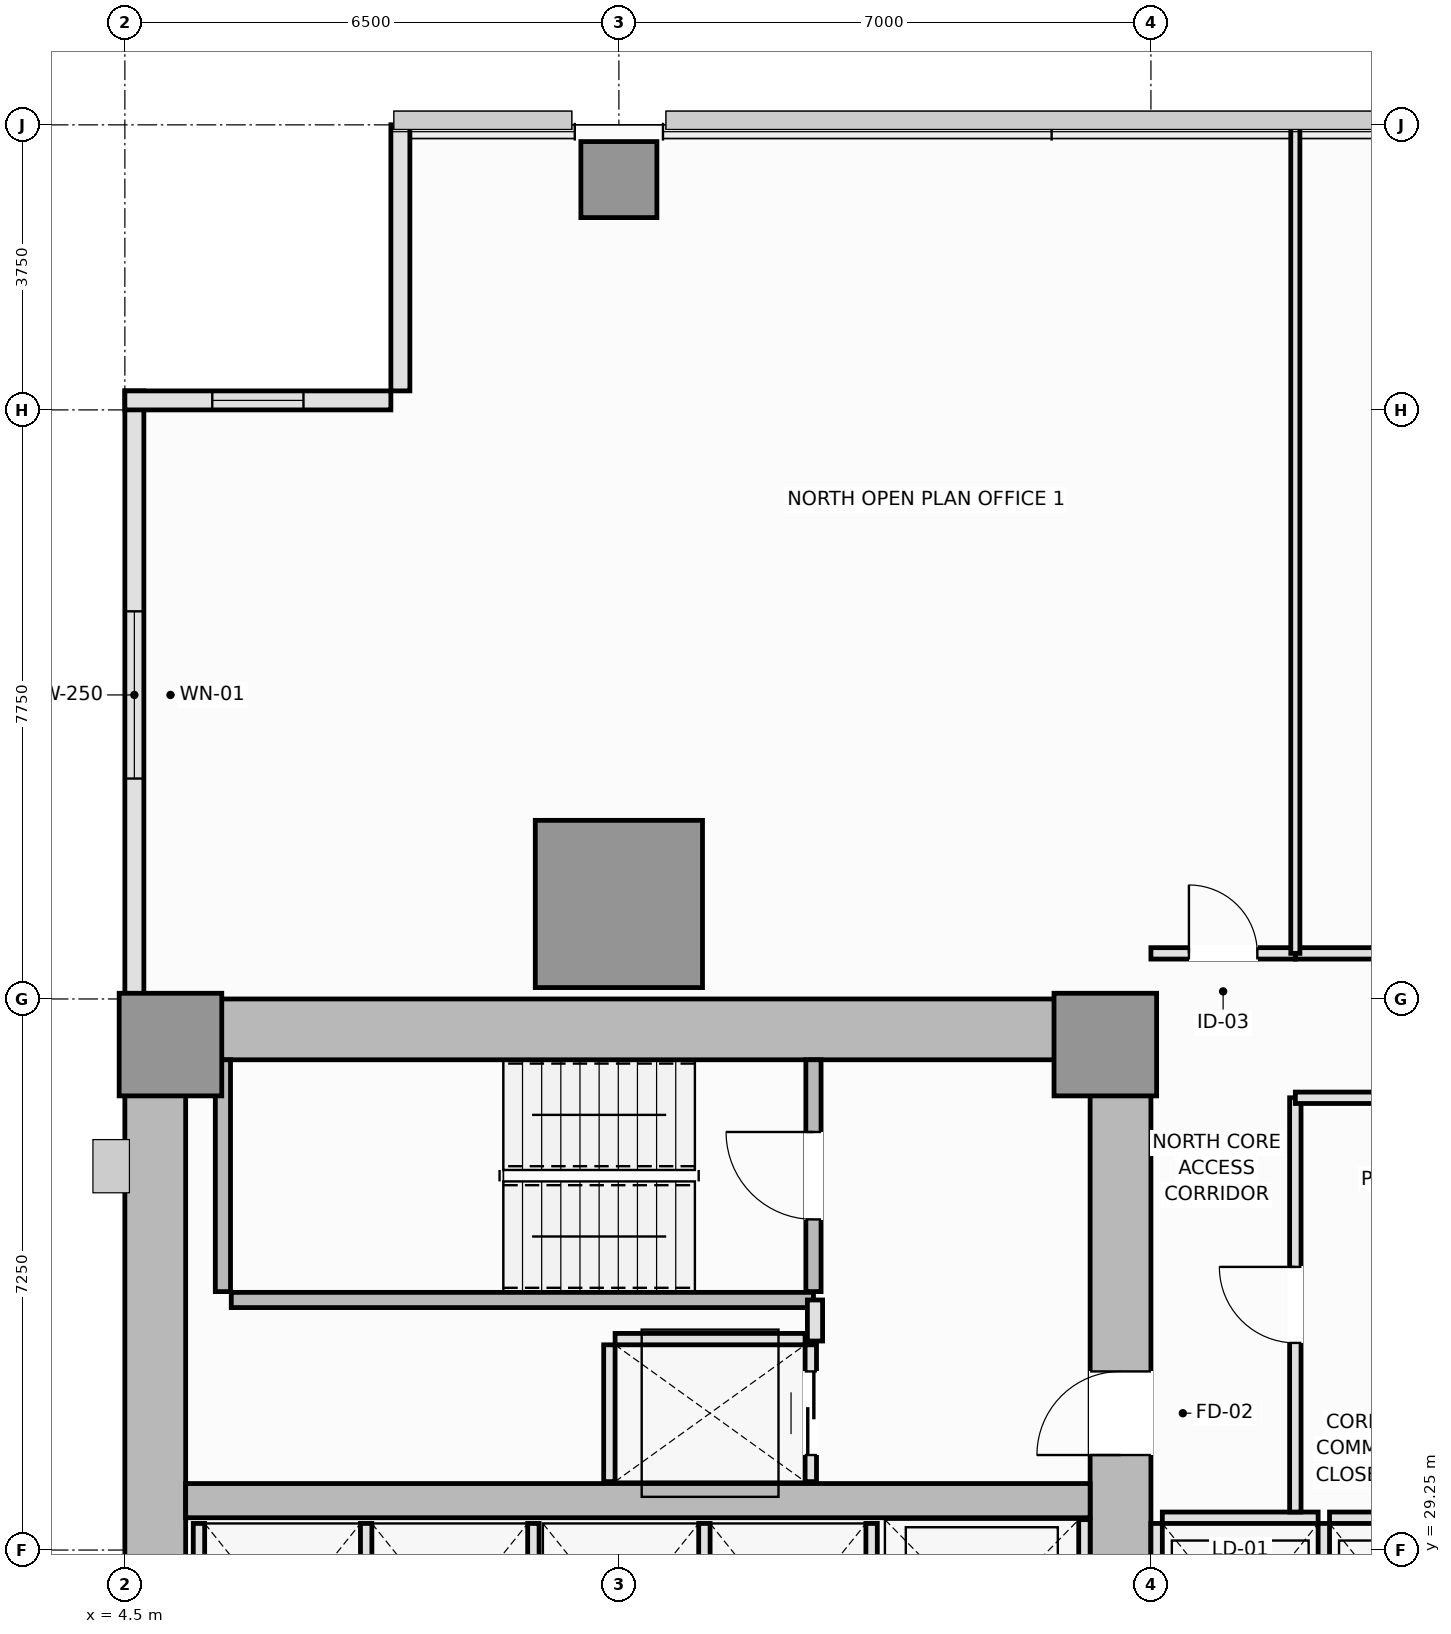
"""IFC4 building model, lengths in metres.
Left out: names, types, materials, properties, quantities, classifications, styles, units other than length and angle.
Written with IfcOpenShell. Run it as: python <this file> out.ifc"""

import sys

from ifc_helpers import new_model, si_unit, direction, frame, frame_2d, origin, origin_2d, place, context, subcontext, project, spatial, rectangle, extrude, element, fill, save


model = new_model("IFC4")
c1 = context("Model", 3, precision=1e-05, world=origin(), true_north=direction((0.0, 1.0)))
c2 = subcontext(c1, "Body", "Model", "MODEL_VIEW")
j1 = project(units=[si_unit("LENGTHUNIT", "METRE"), si_unit("PLANEANGLEUNIT", "RADIAN")], contexts=[c1])
p1 = place(None, origin())
s1 = spatial("IfcSite", under=j1, at=p1, CompositionType="ELEMENT")
p2 = place(p1, origin())
s2 = spatial("IfcBuilding", under=s1, at=p2, CompositionType="ELEMENT")
p3 = place(p2, frame((0.0, 0.0, 54.0)))
s3 = spatial("IfcBuildingStorey", under=s2, at=p3, CompositionType="ELEMENT", Elevation=54.0)
p4 = place(p3, frame((4.5, 36.1, 0.0), z_axis=(0.0, 0.0, 1.0), x_axis=(1.0, 0.0, 0.0)))
e1 = element("IfcWall", 1, at=p4, inside=s3, PredefinedType="SHEAR", context=c2, shape_type="SweptSolid", body=[
    extrude(rectangle(XDim=13.5, YDim=0.8, at=frame_2d((6.75, 0.0))), origin(), (0.0, 0.0, 1.0), 3.55),
])
p5 = place(p3, frame((4.9, 14.8, 0.0), z_axis=(0.0, 0.0, 1.0), x_axis=(0.0, 1.0, 0.0)))
e2 = element("IfcWall", 2, at=p5, inside=s3, PredefinedType="SHEAR", context=c2, shape_type="SweptSolid", body=[
    extrude(rectangle(XDim=20.9, YDim=0.8, at=frame_2d((10.45, 0.0))), origin(), (0.0, 0.0, 1.0), 3.55),
])
p6 = place(p3, frame((17.6, 27.05, 0.0), z_axis=(0.0, 0.0, 1.0), x_axis=(0.0, 1.0, 0.0)))
e3 = element("IfcWall", 3, at=p6, inside=s3, PredefinedType="SHEAR", context=c2, shape_type="SweptSolid", body=[
    extrude(rectangle(XDim=8.65, YDim=0.8, at=frame_2d((4.325, 0.0))), origin(), (0.0, 0.0, 1.0), 3.55),
])
p7 = place(p6, frame((3.45, 0.0, 0.0)))
e4 = element("IfcOpeningElement", 4, at=p7, cuts=e3, PredefinedType="OPENING", context=c2, shape_type="SweptSolid", body=[
    extrude(rectangle(XDim=1.1, YDim=2.15, at=frame_2d((0.55, 1.075))), frame((0.0, 0.41, 0.0), z_axis=(0.0, -1.0, 0.0), x_axis=(1.0, 0.0, 0.0)), (0.0, 0.0, 1.0), 0.82),
])
p8 = place(p3, frame((5.3, 29.9, 0.0), z_axis=(0.0, 0.0, 1.0), x_axis=(1.0, 0.0, 0.0)))
e5 = element("IfcWall", 5, at=p8, inside=s3, PredefinedType="SHEAR", context=c2, shape_type="SweptSolid", body=[
    extrude(rectangle(XDim=11.9, YDim=0.45, at=frame_2d((5.95, 0.0))), origin(), (0.0, 0.0, 1.0), 3.55),
])
for number, where, z_axis, x_axis in (
    (6, (5.1, 35.9, 0.0), (0.0, 0.0, 1.0), (1.0, 0.0, 0.0)),
    (7, (17.4, 35.9, 0.0), (0.0, 0.0, 1.0), (1.0, 0.0, 0.0)),
):
    element("IfcColumn", number, at=place(p3, frame(where, z_axis=z_axis, x_axis=x_axis)), inside=s3, PredefinedType="PILASTER", context=c2, shape_type="SweptSolid", body=[
        extrude(rectangle(XDim=1.35, YDim=1.35, at=origin_2d()), origin(), (0.0, 0.0, 1.0), 3.55),
    ])
p9 = place(p3, frame((11.0, 37.75, 0.0), z_axis=(0.0, 0.0, 1.0), x_axis=(1.0, 0.0, 0.0)))
e8 = element("IfcColumn", 8, at=p9, inside=s3, PredefinedType="COLUMN", context=c2, shape_type="SweptSolid", body=[
    extrude(rectangle(XDim=2.2, YDim=2.2, at=origin_2d()), origin(), (0.0, 0.0, 1.0), 3.55),
])
p10 = place(p3, frame((11.0, 47.28, 0.0), z_axis=(0.0, 0.0, 1.0), x_axis=(1.0, 0.0, 0.0)))
e9 = element("IfcColumn", 9, at=p10, inside=s3, PredefinedType="COLUMN", context=c2, shape_type="SweptSolid", body=[
    extrude(rectangle(XDim=1.0, YDim=1.0, at=origin_2d()), origin(), (0.0, 0.0, 1.0), 3.55),
])
p11 = place(p3, frame((4.625, 44.5, 0.0), z_axis=(0.0, 0.0, 1.0), x_axis=(0.0, -1.0, 0.0)))
e10 = element("IfcWall", 10, at=p11, inside=s3, PredefinedType="SOLIDWALL", context=c2, shape_type="SweptSolid", body=[
    extrude(rectangle(XDim=8.0, YDim=0.25, at=frame_2d((4.0, 0.0))), origin(), (0.0, 0.0, 1.0), 3.37),
])
p12 = place(p11, frame((2.9, 0.0, 0.9)))
e11 = element("IfcOpeningElement", 11, at=p12, cuts=e10, PredefinedType="OPENING", context=c2, shape_type="SweptSolid", body=[
    extrude(rectangle(XDim=2.2, YDim=1.8, at=frame_2d((1.1, 0.9))), frame((0.0, 0.135, 0.0), z_axis=(0.0, -1.0, 0.0), x_axis=(1.0, 0.0, 0.0)), (0.0, 0.0, 1.0), 0.27),
])
p13 = place(p3, frame((8.125, 48.0, 0.0), z_axis=(0.0, 0.0, 1.0), x_axis=(0.0, -1.0, 0.0)))
e12 = element("IfcWall", 12, at=p13, inside=s3, PredefinedType="SOLIDWALL", context=c2, shape_type="SweptSolid", body=[
    extrude(rectangle(XDim=3.5, YDim=0.25, at=frame_2d((1.75, 0.0))), origin(), (0.0, 0.0, 1.0), 3.37),
])
p14 = place(p3, frame((8.0, 44.375, 0.0), z_axis=(0.0, 0.0, 1.0), x_axis=(-1.0, 0.0, 0.0)))
e13 = element("IfcWall", 13, at=p14, inside=s3, PredefinedType="SOLIDWALL", context=c2, shape_type="SweptSolid", body=[
    extrude(rectangle(XDim=3.5, YDim=0.25, at=frame_2d((1.75, 0.0))), origin(), (0.0, 0.0, 1.0), 3.37),
])
p15 = place(p14, frame((1.15, 0.0, 0.9)))
e14 = element("IfcOpeningElement", 14, at=p15, cuts=e13, PredefinedType="OPENING", context=c2, shape_type="SweptSolid", body=[
    extrude(rectangle(XDim=1.2, YDim=1.8, at=frame_2d((0.6, 0.9))), frame((0.0, 0.135, 0.0), z_axis=(0.0, -1.0, 0.0), x_axis=(1.0, 0.0, 0.0)), (0.0, 0.0, 1.0), 0.27),
])
p16 = place(p3, frame((5.79, 32.65, 0.0), z_axis=(0.0, 0.0, 1.0), x_axis=(0.0, 1.0, 0.0)))
e15 = element("IfcWall", 15, at=p16, inside=s3, PredefinedType="SOLIDWALL", context=c2, shape_type="SweptSolid", body=[
    extrude(rectangle(XDim=3.05, YDim=0.2, at=frame_2d((1.525, 0.0))), origin(), (0.0, 0.0, 1.0), 3.55),
])
p17 = place(p3, frame((5.9, 32.54, 0.0), z_axis=(0.0, 0.0, 1.0), x_axis=(1.0, 0.0, 0.0)))
e16 = element("IfcWall", 16, at=p17, inside=s3, PredefinedType="SOLIDWALL", context=c2, shape_type="SweptSolid", body=[
    extrude(rectangle(XDim=7.66, YDim=0.2, at=frame_2d((3.83, 0.0))), origin(), (0.0, 0.0, 1.0), 3.55),
])
p18 = place(p3, frame((13.56, 32.65, 0.0), z_axis=(0.0, 0.0, 1.0), x_axis=(0.0, 1.0, 0.0)))
e17 = element("IfcWall", 17, at=p18, inside=s3, PredefinedType="SOLIDWALL", context=c2, shape_type="SweptSolid", body=[
    extrude(rectangle(XDim=3.05, YDim=0.2, at=frame_2d((1.525, 0.0))), origin(), (0.0, 0.0, 1.0), 3.55),
])
p19 = place(p18, frame((0.95, 0.0, 0.0)))
e18 = element("IfcOpeningElement", 18, at=p19, cuts=e17, PredefinedType="OPENING", context=c2, shape_type="SweptSolid", body=[
    extrude(rectangle(XDim=1.15, YDim=2.15, at=frame_2d((0.575, 1.075))), frame((0.0, 0.11, 0.0), z_axis=(0.0, -1.0, 0.0), x_axis=(1.0, 0.0, 0.0)), (0.0, 0.0, 1.0), 0.22),
])
p20 = place(p3, frame((18.15, 29.675, 0.0), z_axis=(0.0, 0.0, 1.0), x_axis=(1.0, 0.0, 0.0)))
e19 = element("IfcWall", 19, at=p20, inside=s3, PredefinedType="PARTITIONING", context=c2, shape_type="SweptSolid", body=[
    extrude(rectangle(XDim=2.05, YDim=0.15, at=frame_2d((1.025, 0.0))), origin(), (0.0, 0.0, 1.0), 3.37),
])
for number, where, z_axis, x_axis in (
    (20, (18.075, 27.05, 0.0), (0.0, 0.0, 1.0), (0.0, 1.0, 0.0)),
    (21, (20.275, 27.05, 0.0), (0.0, 0.0, 1.0), (0.0, 1.0, 0.0)),
):
    element("IfcWall", number, at=place(p3, frame(where, z_axis=z_axis, x_axis=x_axis)), inside=s3, PredefinedType="PARTITIONING", context=c2, shape_type="SweptSolid", body=[
        extrude(rectangle(XDim=2.55, YDim=0.15, at=frame_2d((1.275, 0.0))), origin(), (0.0, 0.0, 1.0), 3.37),
    ])
p21 = place(p3, frame((20.35, 29.675, 0.0), z_axis=(0.0, 0.0, 1.0), x_axis=(1.0, 0.0, 0.0)))
e22 = element("IfcWall", 22, at=p21, inside=s3, PredefinedType="PARTITIONING", context=c2, shape_type="SweptSolid", body=[
    extrude(rectangle(XDim=2.05, YDim=0.15, at=frame_2d((1.025, 0.0))), origin(), (0.0, 0.0, 1.0), 3.37),
])
for number, where, z_axis, x_axis in (
    (23, (5.475, 27.05, 0.0), (0.0, 0.0, 1.0), (0.0, 1.0, 0.0)),
    (24, (7.675, 27.05, 0.0), (0.0, 0.0, 1.0), (0.0, 1.0, 0.0)),
    (25, (9.875, 27.05, 0.0), (0.0, 0.0, 1.0), (0.0, 1.0, 0.0)),
    (26, (12.125, 27.05, 0.0), (0.0, 0.0, 1.0), (0.0, 1.0, 0.0)),
    (27, (14.325, 27.05, 0.0), (0.0, 0.0, 1.0), (0.0, 1.0, 0.0)),
):
    element("IfcWall", number, at=place(p3, frame(where, z_axis=z_axis, x_axis=x_axis)), inside=s3, PredefinedType="PARTITIONING", context=c2, shape_type="SweptSolid", body=[
        extrude(rectangle(XDim=2.55, YDim=0.15, at=frame_2d((1.275, 0.0))), origin(), (0.0, 0.0, 1.0), 3.37),
    ])
p22 = place(p3, frame((17.125, 27.05, 0.0), z_axis=(0.0, 0.0, 1.0), x_axis=(0.0, 1.0, 0.0)))
e28 = element("IfcWall", 28, at=p22, inside=s3, PredefinedType="PARTITIONING", context=c2, shape_type="SweptSolid", body=[
    extrude(rectangle(XDim=2.6, YDim=0.15, at=frame_2d((1.3, 0.0))), origin(), (0.0, 0.0, 1.0), 3.37),
])
p23 = place(p3, frame((10.95, 32.025, 0.0), z_axis=(0.0, 0.0, 1.0), x_axis=(1.0, 0.0, 0.0)))
e29 = element("IfcWall", 29, at=p23, inside=s3, PredefinedType="PARTITIONING", context=c2, shape_type="SweptSolid", body=[
    extrude(rectangle(XDim=2.5, YDim=0.15, at=frame_2d((1.25, 0.0))), origin(), (0.0, 0.0, 1.0), 3.37),
])
p24 = place(p3, frame((10.875, 30.15, 0.0), z_axis=(0.0, 0.0, 1.0), x_axis=(0.0, 1.0, 0.0)))
e30 = element("IfcWall", 30, at=p24, inside=s3, PredefinedType="PARTITIONING", context=c2, shape_type="SweptSolid", body=[
    extrude(rectangle(XDim=1.8, YDim=0.15, at=frame_2d((0.9, 0.0))), origin(), (0.0, 0.0, 1.0), 3.37),
])
p25 = place(p3, frame((13.525, 30.15, 0.0), z_axis=(0.0, 0.0, 1.0), x_axis=(0.0, 1.0, 0.0)))
e31 = element("IfcWall", 31, at=p25, inside=s3, PredefinedType="PARTITIONING", context=c2, shape_type="SweptSolid", body=[
    extrude(rectangle(XDim=1.8, YDim=0.15, at=frame_2d((0.9, 0.0))), origin(), (0.0, 0.0, 1.0), 3.37),
])
p26 = place(p25, frame((0.35, 0.0, 0.0)))
e32 = element("IfcOpeningElement", 32, at=p26, cuts=e31, PredefinedType="OPENING", context=c2, shape_type="SweptSolid", body=[
    extrude(rectangle(XDim=1.1, YDim=2.2, at=frame_2d((0.55, 1.1))), frame((0.0, 0.085, 0.0), z_axis=(0.0, -1.0, 0.0), x_axis=(1.0, 0.0, 0.0)), (0.0, 0.0, 1.0), 0.17),
])
p27 = place(p3, frame((13.58, 32.0, 0.0), z_axis=(0.0, 0.0, 1.0), x_axis=(0.0, 1.0, 0.0)))
e33 = element("IfcWall", 33, at=p27, inside=s3, PredefinedType="PARTITIONING", context=c2, shape_type="SweptSolid", body=[
    extrude(rectangle(XDim=0.54, YDim=0.2, at=frame_2d((0.27, 0.0))), origin(), (0.0, 0.0, 1.0), 3.37),
])
p28 = place(p3, frame((19.9, 29.75, 0.0), z_axis=(0.0, 0.0, 1.0), x_axis=(0.0, 1.0, 0.0)))
e34 = element("IfcWall", 34, at=p28, inside=s3, PredefinedType="PARTITIONING", context=c2, shape_type="SweptSolid", body=[
    extrude(rectangle(XDim=5.45, YDim=0.15, at=frame_2d((2.725, 0.0))), origin(), (0.0, 0.0, 1.0), 3.37),
])
p29 = place(p28, frame((2.225, 0.0, 0.0)))
e35 = element("IfcOpeningElement", 35, at=p29, cuts=e34, PredefinedType="OPENING", context=c2, shape_type="SweptSolid", body=[
    extrude(rectangle(XDim=1.0, YDim=2.15, at=frame_2d((0.5, 1.075))), frame((0.0, 0.085, 0.0), z_axis=(0.0, -1.0, 0.0), x_axis=(1.0, 0.0, 0.0)), (0.0, 0.0, 1.0), 0.17),
])
p30 = place(p3, frame((19.9, 35.2, 0.0), z_axis=(0.0, 0.0, 1.0), x_axis=(1.0, 0.0, 0.0)))
e36 = element("IfcWall", 36, at=p30, inside=s3, PredefinedType="PARTITIONING", context=c2, shape_type="SweptSolid", body=[
    extrude(rectangle(XDim=1.35, YDim=0.15, at=frame_2d((0.675, 0.0))), origin(), (0.0, 0.0, 1.0), 3.37),
])
p31 = place(p3, frame((18.0, 37.1, 0.0), z_axis=(0.0, 0.0, 1.0), x_axis=(1.0, 0.0, 0.0)))
e37 = element("IfcWall", 37, at=p31, inside=s3, PredefinedType="PARTITIONING", context=c2, shape_type="SweptSolid", body=[
    extrude(rectangle(XDim=1.9, YDim=0.15, at=frame_2d((0.95, 0.0))), origin(), (0.0, 0.0, 1.0), 3.37),
])
p32 = place(p31, frame((0.5, 0.0, 0.0)))
e38 = element("IfcOpeningElement", 38, at=p32, cuts=e37, PredefinedType="OPENING", context=c2, shape_type="SweptSolid", body=[
    extrude(rectangle(XDim=0.9, YDim=2.1, at=frame_2d((0.45, 1.05))), frame((0.0, 0.085, 0.0), z_axis=(0.0, -1.0, 0.0), x_axis=(1.0, 0.0, 0.0)), (0.0, 0.0, 1.0), 0.17),
])
p33 = place(p3, frame((19.9, 37.1, 0.0), z_axis=(0.0, 0.0, 1.0), x_axis=(1.0, 0.0, 0.0)))
e39 = element("IfcWall", 39, at=p33, inside=s3, PredefinedType="PARTITIONING", context=c2, shape_type="SweptSolid", body=[
    extrude(rectangle(XDim=3.7, YDim=0.15, at=frame_2d((1.85, 0.0))), origin(), (0.0, 0.0, 1.0), 3.37),
])
p34 = place(p33, frame((1.35, 0.0, 0.0)))
e40 = element("IfcOpeningElement", 40, at=p34, cuts=e39, PredefinedType="OPENING", context=c2, shape_type="SweptSolid", body=[
    extrude(rectangle(XDim=1.0, YDim=2.15, at=frame_2d((0.5, 1.075))), frame((0.0, 0.085, 0.0), z_axis=(0.0, -1.0, 0.0), x_axis=(1.0, 0.0, 0.0)), (0.0, 0.0, 1.0), 0.17),
])
p35 = place(p3, frame((19.9, 37.1, 0.0), z_axis=(0.0, 0.0, 1.0), x_axis=(0.0, 1.0, 0.0)))
e41 = element("IfcWall", 41, at=p35, inside=s3, PredefinedType="PARTITIONING", context=c2, shape_type="SweptSolid", body=[
    extrude(rectangle(XDim=10.89, YDim=0.12, at=frame_2d((5.445, 0.0))), origin(), (0.0, 0.0, 1.0), 3.37),
])
p36 = place(p12, origin())
e42 = element("IfcWindow", 42, at=p36, inside=s3, PartitioningType="SINGLE_PANEL", PredefinedType="WINDOW", context=c2, shape_type="SweptSolid", body=[
    extrude(rectangle(XDim=2.2, YDim=1.8, at=frame_2d((1.1, 0.9))), frame((0.0, 0.03, 0.0), z_axis=(0.0, -1.0, 0.0), x_axis=(1.0, 0.0, 0.0)), (0.0, 0.0, 1.0), 0.06),
])
fill(e11, e42)
p37 = place(p15, origin())
e43 = element("IfcWindow", 43, at=p37, inside=s3, PartitioningType="SINGLE_PANEL", PredefinedType="WINDOW", context=c2, shape_type="SweptSolid", body=[
    extrude(rectangle(XDim=1.2, YDim=1.8, at=frame_2d((0.6, 0.9))), frame((0.0, 0.03, 0.0), z_axis=(0.0, -1.0, 0.0), x_axis=(1.0, 0.0, 0.0)), (0.0, 0.0, 1.0), 0.06),
])
fill(e14, e43)
p38 = place(p19, origin())
e44 = element("IfcDoor", 44, at=p38, inside=s3, OperationType="SINGLE_SWING_RIGHT", PredefinedType="DOOR", context=c2, shape_type="SweptSolid", body=[
    extrude(rectangle(XDim=1.15, YDim=2.15, at=frame_2d((0.575, 1.075))), frame((0.0, 0.025, 0.0), z_axis=(0.0, -1.0, 0.0), x_axis=(1.0, 0.0, 0.0)), (0.0, 0.0, 1.0), 0.05),
])
fill(e18, e44)
p39 = place(p26, origin())
e45 = element("IfcDoor", 45, at=p39, inside=s3, OperationType="DOUBLE_DOOR_SLIDING", PredefinedType="DOOR", context=c2, shape_type="SweptSolid", body=[
    extrude(rectangle(XDim=1.1, YDim=2.2, at=frame_2d((0.55, 1.1))), frame((0.0, 0.025, 0.0), z_axis=(0.0, -1.0, 0.0), x_axis=(1.0, 0.0, 0.0)), (0.0, 0.0, 1.0), 0.05),
])
fill(e32, e45)
p40 = place(p7, origin())
e46 = element("IfcDoor", 46, at=p40, inside=s3, OperationType="SINGLE_SWING_LEFT", PredefinedType="DOOR", context=c2, shape_type="SweptSolid", body=[
    extrude(rectangle(XDim=1.1, YDim=2.15, at=frame_2d((0.55, 1.075))), frame((0.0, 0.025, 0.0), z_axis=(0.0, -1.0, 0.0), x_axis=(1.0, 0.0, 0.0)), (0.0, 0.0, 1.0), 0.05),
])
fill(e4, e46)
p41 = place(p29, origin())
e47 = element("IfcDoor", 47, at=p41, inside=s3, OperationType="SINGLE_SWING_RIGHT", PredefinedType="DOOR", context=c2, shape_type="SweptSolid", body=[
    extrude(rectangle(XDim=1.0, YDim=2.15, at=frame_2d((0.5, 1.075))), frame((0.0, 0.025, 0.0), z_axis=(0.0, -1.0, 0.0), x_axis=(1.0, 0.0, 0.0)), (0.0, 0.0, 1.0), 0.05),
])
fill(e35, e47)
p42 = place(p32, origin())
e48 = element("IfcDoor", 48, at=p42, inside=s3, OperationType="SINGLE_SWING_LEFT", PredefinedType="DOOR", context=c2, shape_type="SweptSolid", body=[
    extrude(rectangle(XDim=0.9, YDim=2.1, at=frame_2d((0.45, 1.05))), frame((0.0, 0.025, 0.0), z_axis=(0.0, -1.0, 0.0), x_axis=(1.0, 0.0, 0.0)), (0.0, 0.0, 1.0), 0.05),
])
fill(e38, e48)
save(model, sys.argv[1])
